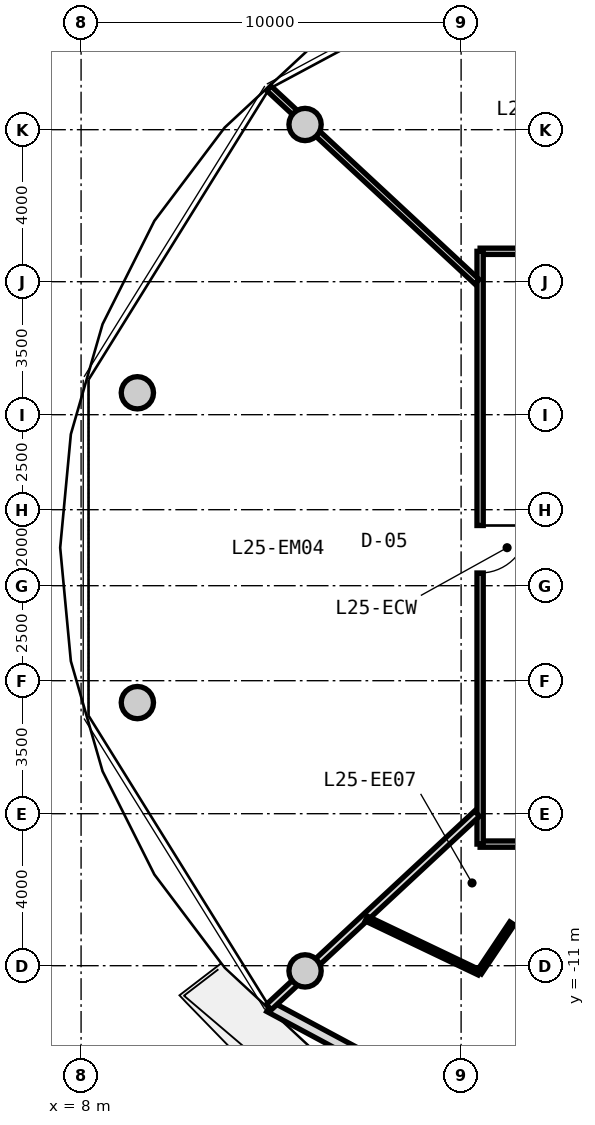
"""IFC4 building model, lengths in metres.
Left out: names, types, materials, properties, quantities, classifications, styles, units other than length and angle.
Written with IfcOpenShell. Run it as: python <this file> out.ifc"""

import sys

from ifc_helpers import new_model, si_unit, direction, frame, frame_2d, origin, origin_2d, place, context, subcontext, project, spatial, rectangle, circle, extrude, source, transform, mapped, element, fill, save


model = new_model("IFC4")
c1 = context("Model", 3, precision=1e-05, world=origin(), true_north=direction((0.0, 1.0)))
c2 = subcontext(c1, "Body", "Model", "MODEL_VIEW")
j1 = project(units=[si_unit("LENGTHUNIT", "METRE"), si_unit("PLANEANGLEUNIT", "RADIAN")], contexts=[c1])
p1 = place(None, origin())
s1 = spatial("IfcSite", under=j1, at=p1, CompositionType="ELEMENT")
p2 = place(p1, origin())
s2 = spatial("IfcBuilding", under=s1, at=p2, CompositionType="ELEMENT")
p3 = place(p2, frame((0.0, 0.0, 84.05)))
s3 = spatial("IfcBuildingStorey", under=s2, at=p3, CompositionType="ELEMENT", Elevation=84.05)
m1 = source(origin(), c2, "Body", "SweptSolid", [
    extrude(circle(Radius=0.425, at=origin_2d()), origin(), (0.0, 0.0, 1.0), 3.05),
])
for number, where, z_axis, x_axis in (
    (1, (13.894, 11.137, 0.0), (0.0, 0.0, 1.0), (1.0, 0.0, 0.0)),
    (2, (9.481, 4.076, 0.0), (0.0, 0.0, 1.0), (1.0, 0.0, 0.0)),
    (3, (9.481, -4.076, 0.0), (0.0, 0.0, 1.0), (1.0, 0.0, 0.0)),
    (4, (13.894, -11.137, 0.0), (0.0, 0.0, 1.0), (1.0, 0.0, 0.0)),
):
    element("IfcColumn", number, at=place(p3, frame(where, z_axis=z_axis, x_axis=x_axis)), inside=s3, PredefinedType="COLUMN", context=c2, shape_type="MappedRepresentation", body=[
        mapped(m1, transform((0.0, 0.0, 0.0), x_axis=(1.0, 0.0, 0.0), y_axis=(0.0, 1.0, 0.0), z_axis=(0.0, 0.0, 1.0), scale=1.0)),
    ])
m2 = source(origin(), c2, "Body", "SweptSolid", [
    extrude(rectangle(XDim=9.351, YDim=0.29, at=frame_2d((4.675, 0.0))), origin(), (0.0, 0.0, 1.0), 2.79),
])
p4 = place(p3, frame((21.193, -16.498, 0.0), z_axis=(0.0, 0.0, 1.0), x_axis=(-0.881184411073, 0.472772708267, 0.0)))
e5 = element("IfcWall", 5, at=p4, inside=s3, PredefinedType="SOLIDWALL", context=c2, shape_type="MappedRepresentation", body=[
    mapped(m2, transform((0.0, 0.0, 0.0), x_axis=(1.0, 0.0, 0.0), y_axis=(0.0, 1.0, 0.0), z_axis=(0.0, 0.0, 1.0), scale=1.0)),
])
p5 = place(p4, frame((0.9, 0.0, 0.0)))
e6 = element("IfcOpeningElement", 6, at=p5, cuts=e5, PredefinedType="OPENING", context=c2, shape_type="SweptSolid", body=[
    extrude(rectangle(XDim=1.15, YDim=2.25, at=frame_2d((0.575, 1.125))), frame((0.0, 0.155, 0.0), z_axis=(0.0, -1.0, 0.0), x_axis=(1.0, 0.0, 0.0)), (0.0, 0.0, 1.0), 0.31),
])
p6 = place(p4, frame((5.025, 0.0, 0.85)))
e7 = element("IfcOpeningElement", 7, at=p6, cuts=e5, PredefinedType="OPENING", context=c2, shape_type="SweptSolid", body=[
    extrude(rectangle(XDim=1.2, YDim=1.5, at=frame_2d((0.6, 0.75))), frame((0.0, 0.155, 0.0), z_axis=(0.0, -1.0, 0.0), x_axis=(1.0, 0.0, 0.0)), (0.0, 0.0, 1.0), 0.31),
])
m3 = source(origin(), c2, "Body", "SweptSolid", [
    extrude(rectangle(XDim=8.6, YDim=0.165, at=frame_2d((4.3, 0.0))), origin(), (0.0, 0.0, 1.0), 2.775),
])
p7 = place(p3, frame((18.5, 7.8, 0.0), z_axis=(0.0, 0.0, 1.0), x_axis=(1.0, 0.0, 0.0)))
e8 = element("IfcWall", 8, at=p7, inside=s3, PredefinedType="PARTITIONING", context=c2, shape_type="MappedRepresentation", body=[
    mapped(m3, transform((0.0, 0.0, 0.0), x_axis=(1.0, 0.0, 0.0), y_axis=(0.0, 1.0, 0.0), z_axis=(0.0, 0.0, 1.0), scale=1.0)),
])
p8 = place(p7, frame((3.775, 0.0, 0.0)))
e9 = element("IfcOpeningElement", 9, at=p8, cuts=e8, PredefinedType="OPENING", context=c2, shape_type="SweptSolid", body=[
    extrude(rectangle(XDim=1.05, YDim=2.15, at=frame_2d((0.525, 1.075))), frame((0.0, 0.093, 0.0), z_axis=(0.0, -1.0, 0.0), x_axis=(1.0, 0.0, 0.0)), (0.0, 0.0, 1.0), 0.185),
])
p9 = place(p3, frame((27.1, -7.8, 0.0), z_axis=(0.0, 0.0, 1.0), x_axis=(-1.0, 0.0, 0.0)))
e10 = element("IfcWall", 10, at=p9, inside=s3, PredefinedType="PARTITIONING", context=c2, shape_type="MappedRepresentation", body=[
    mapped(m3, transform((0.0, 0.0, 0.0), x_axis=(1.0, 0.0, 0.0), y_axis=(0.0, 1.0, 0.0), z_axis=(0.0, 0.0, 1.0), scale=1.0)),
])
p10 = place(p9, frame((4.384, 0.0, 0.0)))
e11 = element("IfcOpeningElement", 11, at=p10, cuts=e10, PredefinedType="OPENING", context=c2, shape_type="SweptSolid", body=[
    extrude(rectangle(XDim=1.05, YDim=2.15, at=frame_2d((0.525, 1.075))), frame((0.0, 0.093, 0.0), z_axis=(0.0, -1.0, 0.0), x_axis=(1.0, 0.0, 0.0)), (0.0, 0.0, 1.0), 0.185),
])
m4 = source(origin(), c2, "Body", "SweptSolid", [
    extrude(rectangle(XDim=15.6, YDim=0.165, at=frame_2d((7.8, 0.0))), origin(), (0.0, 0.0, 1.0), 2.775),
])
p11 = place(p3, frame((18.5, -7.8, 0.0), z_axis=(0.0, 0.0, 1.0), x_axis=(0.0, 1.0, 0.0)))
e12 = element("IfcWall", 12, at=p11, inside=s3, PredefinedType="PARTITIONING", context=c2, shape_type="MappedRepresentation", body=[
    mapped(m4, transform((0.0, 0.0, 0.0), x_axis=(1.0, 0.0, 0.0), y_axis=(0.0, 1.0, 0.0), z_axis=(0.0, 0.0, 1.0), scale=1.0)),
])
p12 = place(p11, frame((7.134, 0.0, 0.0)))
e13 = element("IfcOpeningElement", 13, at=p12, cuts=e12, PredefinedType="OPENING", context=c2, shape_type="SweptSolid", body=[
    extrude(rectangle(XDim=1.25, YDim=2.2, at=frame_2d((0.625, 1.1))), frame((0.0, 0.093, 0.0), z_axis=(0.0, -1.0, 0.0), x_axis=(1.0, 0.0, 0.0)), (0.0, 0.0, 1.0), 0.185),
])
m5 = source(origin(), c2, "Body", "SweptSolid", [
    extrude(rectangle(XDim=7.482, YDim=0.165, at=frame_2d((3.741, 0.0))), origin(), (0.0, 0.0, 1.0), 2.275),
])
p13 = place(p3, frame((18.42, 6.998, 0.0), z_axis=(0.0, 0.0, 1.0), x_axis=(-0.732508698043, 0.680757671489, 0.0)))
e14 = element("IfcWall", 14, at=p13, inside=s3, PredefinedType="PARTITIONING", context=c2, shape_type="MappedRepresentation", body=[
    mapped(m5, transform((0.0, 0.0, 0.0), x_axis=(1.0, 0.0, 0.0), y_axis=(0.0, 1.0, 0.0), z_axis=(0.0, 0.0, 1.0), scale=1.0)),
])
m6 = source(origin(), c2, "Body", "SweptSolid", [
    extrude(rectangle(XDim=7.482, YDim=0.19, at=frame_2d((3.741, 0.0))), origin(), (0.0, 0.0, 1.0), 2.275),
])
p14 = place(p3, frame((18.42, -6.998, 0.0), z_axis=(0.0, 0.0, 1.0), x_axis=(-0.732508698043, -0.680757671489, 0.0)))
e15 = element("IfcWall", 15, at=p14, inside=s3, PredefinedType="PARTITIONING", context=c2, shape_type="MappedRepresentation", body=[
    mapped(m6, transform((0.0, 0.0, 0.0), x_axis=(1.0, 0.0, 0.0), y_axis=(0.0, 1.0, 0.0), z_axis=(0.0, 0.0, 1.0), scale=1.0)),
])
m7 = source(origin(), c2, "Body", "SweptSolid", [
    extrude(rectangle(XDim=4.027, YDim=0.14, at=frame_2d((2.014, 0.0))), origin(), (0.0, 0.0, 1.0), 2.775),
])
p15 = place(p3, frame((20.714, -7.83, 0.0), z_axis=(0.0, 0.0, 1.0), x_axis=(-0.555832825922, -0.831294093343, 0.0)))
e16 = element("IfcWall", 16, at=p15, inside=s3, PredefinedType="PARTITIONING", context=c2, shape_type="MappedRepresentation", body=[
    mapped(m7, transform((0.0, 0.0, 0.0), x_axis=(1.0, 0.0, 0.0), y_axis=(0.0, 1.0, 0.0), z_axis=(0.0, 0.0, 1.0), scale=1.0)),
])
p16 = place(p15, frame((1.554, 0.0, 0.0)))
e17 = element("IfcOpeningElement", 17, at=p16, cuts=e16, PredefinedType="OPENING", context=c2, shape_type="SweptSolid", body=[
    extrude(rectangle(XDim=0.92, YDim=2.1, at=frame_2d((0.46, 1.05))), frame((0.0, 0.08, 0.0), z_axis=(0.0, -1.0, 0.0), x_axis=(1.0, 0.0, 0.0)), (0.0, 0.0, 1.0), 0.16),
])
m8 = source(origin(), c2, "Body", "SweptSolid", [
    extrude(rectangle(XDim=3.291, YDim=0.14, at=frame_2d((1.646, 0.0))), origin(), (0.0, 0.0, 1.0), 2.775),
])
p17 = place(p3, frame((18.476, -11.178, 0.0), z_axis=(0.0, 0.0, 1.0), x_axis=(-0.902381393443, 0.430938302739, 0.0)))
e18 = element("IfcWall", 18, at=p17, inside=s3, PredefinedType="PARTITIONING", context=c2, shape_type="MappedRepresentation", body=[
    mapped(m8, transform((0.0, 0.0, 0.0), x_axis=(1.0, 0.0, 0.0), y_axis=(0.0, 1.0, 0.0), z_axis=(0.0, 0.0, 1.0), scale=1.0)),
])
m9 = source(origin(), c2, "Body", "SweptSolid", [
    extrude(rectangle(XDim=1.25, YDim=2.2, at=frame_2d((0.625, 1.1))), frame((0.0, 0.025, 0.0), z_axis=(0.0, -1.0, 0.0), x_axis=(1.0, 0.0, 0.0)), (0.0, 0.0, 1.0), 0.05),
])
p18 = place(p12, frame((1.25, 0.0, 0.0), z_axis=(0.0, 0.0, 1.0), x_axis=(-1.0, 0.0, 0.0)))
e19 = element("IfcDoor", 19, at=p18, inside=s3, OperationType="SINGLE_SWING_LEFT", PredefinedType="DOOR", context=c2, shape_type="MappedRepresentation", body=[
    mapped(m9, transform((0.0, 0.0, 0.0), x_axis=(1.0, 0.0, 0.0), y_axis=(0.0, 1.0, 0.0), z_axis=(0.0, 0.0, 1.0), scale=1.0)),
])
fill(e13, e19)
m10 = source(origin(), c2, "Body", "SweptSolid", [
    extrude(rectangle(XDim=0.92, YDim=2.1, at=frame_2d((0.46, 1.05))), frame((0.0, 0.025, 0.0), z_axis=(0.0, -1.0, 0.0), x_axis=(1.0, 0.0, 0.0)), (0.0, 0.0, 1.0), 0.05),
])
p19 = place(p16, origin())
e20 = element("IfcDoor", 20, at=p19, inside=s3, OperationType="SINGLE_SWING_LEFT", PredefinedType="DOOR", context=c2, shape_type="MappedRepresentation", body=[
    mapped(m10, transform((0.0, 0.0, 0.0), x_axis=(1.0, 0.0, 0.0), y_axis=(0.0, 1.0, 0.0), z_axis=(0.0, 0.0, 1.0), scale=1.0)),
])
fill(e17, e20)
save(model, sys.argv[1])
